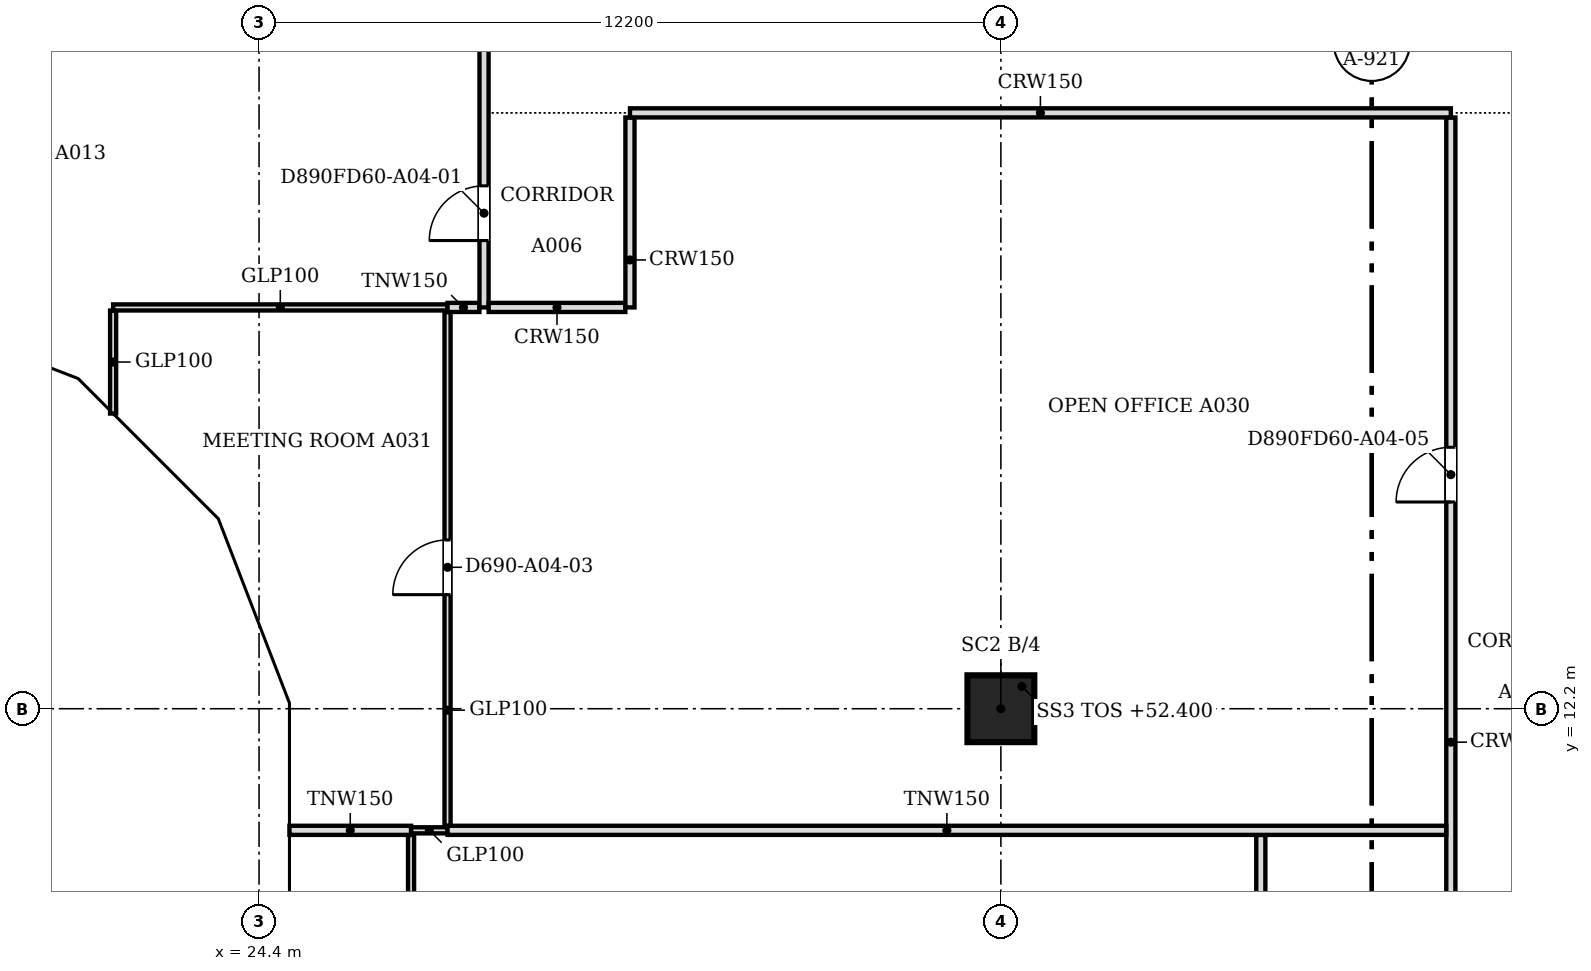
"""IFC4 building model, lengths in metres.
Left out: names, types, materials, properties, quantities, classifications, styles, units other than length and angle.
Written with IfcOpenShell. Run it as: python <this file> out.ifc"""

import sys

from ifc_helpers import new_model, si_unit, direction, frame, frame_2d, origin, origin_2d, place, context, subcontext, project, spatial, polyline, rectangle, outline, extrude, faceted_brep, source, transform, mapped, element, fill, save


model = new_model("IFC4")
c1 = context("Model", 3, precision=1e-05, world=origin(), true_north=direction((0.0, 1.0)))
c2 = subcontext(c1, "Body", "Model", "MODEL_VIEW")
j1 = project(units=[si_unit("LENGTHUNIT", "METRE"), si_unit("PLANEANGLEUNIT", "RADIAN")], contexts=[c1])
p1 = place(None, origin())
s1 = spatial("IfcSite", under=j1, at=p1, CompositionType="ELEMENT")
p2 = place(p1, origin())
s2 = spatial("IfcBuilding", under=s1, at=p2, CompositionType="ELEMENT")
p3 = place(p2, frame((0.0, 0.0, 52.4)))
s3 = spatial("IfcBuildingStorey", under=s2, at=p3, CompositionType="ELEMENT", Elevation=52.4)
p4 = place(p3, frame((36.6, 12.2, 0.0), z_axis=(0.0, 0.0, 1.0), x_axis=(1.0, 0.0, 0.0)))
e1 = element("IfcColumn", 1, at=p4, inside=s3, PredefinedType="COLUMN", context=c2, shape_type="SweptSolid", body=[
    extrude(rectangle(XDim=1.1, YDim=1.1, at=origin_2d()), origin(), (0.0, 0.0, 1.0), 3.6),
])
m1 = source(origin(), c2, "Body", "Brep", [
    faceted_brep([(3.096, -0.25, 7.536), (0.047, -0.25, 3.856), (0.047, -0.25, 3.744), (3.096, -0.25, 0.064), (0.0, 0.25, 3.8), (3.149, 0.25, 7.6), (3.202, 0.25, 7.536), (3.202, 0.25, 0.064), (3.149, 0.25, 0.0), (3.149, -0.0, 0.0), (3.149, -0.0, 7.6), (0.0, 0.0, 3.8)], [[[0, 1, 2, 3]], [[4, 5, 6, 7, 8]], [[8, 7, 9]], [[6, 5, 10]], [[5, 4, 11, 1, 0, 10]], [[4, 8, 9, 3, 2, 11]], [[11, 2, 1]], [[3, 9, 7, 6, 10, 0]]]),
])
p5 = place(p3, frame((18.346, 18.55, -3.8), z_axis=(0.0, 0.0, 1.0), x_axis=(0.932985567668, -0.359913782069, 0.0)))
e2 = element("IfcWall", 2, at=p5, inside=s3, PredefinedType="SOLIDWALL", context=c2, shape_type="MappedRepresentation", body=[
    mapped(m1, transform((0.0, 0.0, 0.0), scale=1.0)),
])
m2 = source(origin(), c2, "Body", "SweptSolid", [
    extrude(outline(polyline([(2.949, 6.967), (0.325, 3.8), (2.949, 0.633), (2.949, 6.967)])), frame((0.0, 0.26, 0.0), z_axis=(0.0, -1.0, 0.0), x_axis=(1.0, 0.0, 0.0)), (0.0, 0.0, 1.0), 0.52),
])
p6 = place(p5, origin())
e3 = element("IfcOpeningElement", 3, at=p6, cuts=e2, PredefinedType="OPENING", context=c2, shape_type="MappedRepresentation", body=[
    mapped(m2, transform((0.0, 0.0, 0.0), scale=1.0)),
])
m3 = source(origin(), c2, "Body", "Brep", [
    faceted_brep([(0.106, -0.25, 0.064), (3.156, -0.25, 3.736), (3.156, -0.25, 3.864), (0.106, -0.25, 7.536), (0.0, 0.25, 7.536), (0.053, 0.25, 7.6), (3.209, 0.25, 3.8), (0.053, 0.25, 0.0), (0.0, 0.25, 0.064), (3.209, -0.0, 3.8), (0.053, 0.0, 0.0), (0.053, 0.0, 7.6)], [[[0, 1, 2, 3]], [[4, 5, 6, 7, 8]], [[7, 6, 9, 1, 0, 10]], [[6, 5, 11, 3, 2, 9]], [[5, 4, 11]], [[8, 7, 10]], [[8, 10, 0, 3, 11, 4]], [[1, 9, 2]]]),
])
p7 = place(p3, frame((21.248, 17.454, -3.8), z_axis=(0.0, 0.0, 1.0), x_axis=(0.707106781187, -0.707106781187, 0.0)))
e4 = element("IfcWall", 4, at=p7, inside=s3, PredefinedType="SOLIDWALL", context=c2, shape_type="MappedRepresentation", body=[
    mapped(m3, transform((0.0, 0.0, 0.0), scale=1.0)),
])
m4 = source(origin(), c2, "Body", "SweptSolid", [
    extrude(outline(polyline([(0.253, 0.632), (2.884, 3.8), (0.253, 6.968), (0.253, 0.632)])), frame((0.0, 0.26, 0.0), z_axis=(0.0, -1.0, 0.0), x_axis=(1.0, 0.0, 0.0)), (0.0, 0.0, 1.0), 0.52),
])
p8 = place(p7, origin())
e5 = element("IfcOpeningElement", 5, at=p8, cuts=e4, PredefinedType="OPENING", context=c2, shape_type="MappedRepresentation", body=[
    mapped(m4, transform((0.0, 0.0, 0.0), scale=1.0)),
])
m5 = source(origin(), c2, "Body", "Brep", [
    faceted_brep([(3.103, -0.25, 7.544), (0.053, -0.25, 3.864), (0.053, -0.25, 3.736), (3.103, -0.25, 0.056), (0.0, 0.25, 3.8), (3.149, 0.25, 7.6), (3.196, 0.25, 7.543), (3.196, 0.25, 0.057), (3.149, 0.25, 0.0), (3.149, -0.0, 0.0), (3.149, -0.0, 7.6), (0.0, 0.0, 3.8)], [[[0, 1, 2, 3]], [[4, 5, 6, 7, 8]], [[8, 7, 9]], [[6, 5, 10]], [[5, 4, 11, 1, 0, 10]], [[4, 8, 9, 3, 2, 11]], [[11, 2, 1]], [[3, 9, 7, 6, 10, 0]]]),
])
p9 = place(p3, frame((23.517, 15.185, -3.8), z_axis=(0.0, 0.0, 1.0), x_axis=(0.359864468756, -0.933004589553, 0.0)))
e6 = element("IfcWall", 6, at=p9, inside=s3, PredefinedType="SOLIDWALL", context=c2, shape_type="MappedRepresentation", body=[
    mapped(m5, transform((0.0, 0.0, 0.0), scale=1.0)),
])
p10 = place(p9, origin())
e7 = element("IfcOpeningElement", 7, at=p10, cuts=e6, PredefinedType="OPENING", context=c2, shape_type="MappedRepresentation", body=[
    mapped(m2, transform((0.0, 0.0, 0.0), scale=1.0)),
])
m6 = source(origin(), c2, "Body", "Brep", [
    faceted_brep([(0.093, -0.25, 0.057), (3.143, -0.25, 3.8), (0.093, -0.25, 7.543), (0.0, 0.25, 7.544), (0.047, 0.25, 7.6), (3.143, 0.25, 3.8), (0.047, 0.25, 0.0), (0.0, 0.25, 0.056), (0.047, 0.0, 0.0), (0.047, 0.0, 7.6)], [[[0, 1, 2]], [[3, 4, 5, 6, 7]], [[6, 5, 1, 0, 8]], [[5, 4, 9, 2, 1]], [[4, 3, 9]], [[7, 6, 8]], [[7, 8, 0, 2, 9, 3]]]),
])
p11 = place(p3, frame((24.65, 12.293, -3.8), z_axis=(0.0, 0.0, 1.0), x_axis=(0.0, -1.0, 0.0)))
e8 = element("IfcWall", 8, at=p11, inside=s3, PredefinedType="SOLIDWALL", context=c2, shape_type="MappedRepresentation", body=[
    mapped(m6, transform((0.0, 0.0, 0.0), scale=1.0)),
])
m7 = source(origin(), c2, "Body", "SweptSolid", [
    extrude(outline(polyline([(0.247, 0.641), (2.821, 3.8), (0.247, 6.959), (0.247, 0.641)])), frame((0.0, 0.26, 0.0), z_axis=(0.0, -1.0, 0.0), x_axis=(1.0, 0.0, 0.0)), (0.0, 0.0, 1.0), 0.52),
])
p12 = place(p11, origin())
e9 = element("IfcOpeningElement", 9, at=p12, cuts=e8, PredefinedType="OPENING", context=c2, shape_type="MappedRepresentation", body=[
    mapped(m7, transform((0.0, 0.0, 0.0), scale=1.0)),
])
p13 = place(p2, frame((0.0, 0.0, 56.2)))
s4 = spatial("IfcBuildingStorey", under=s2, at=p13, CompositionType="ELEMENT", Elevation=56.2)
m8 = source(origin(), c2, "Body", "Brep", [
    faceted_brep([(0.093, -0.25, 0.056), (3.143, -0.25, 3.736), (3.143, -0.25, 3.864), (0.093, -0.25, 7.544), (0.0, 0.25, 7.543), (0.047, 0.25, 7.6), (3.196, 0.25, 3.8), (0.047, 0.25, 0.0), (0.0, 0.25, 0.057), (3.196, -0.0, 3.8), (0.047, 0.0, 0.0), (0.047, 0.0, 7.6)], [[[0, 1, 2, 3]], [[4, 5, 6, 7, 8]], [[7, 6, 9, 1, 0, 10]], [[6, 5, 11, 3, 2, 9]], [[5, 4, 11]], [[8, 7, 10]], [[8, 10, 0, 3, 11, 4]], [[1, 9, 2]]]),
])
p14 = place(p13, frame((18.303, 18.567, -3.8), z_axis=(0.0, 0.0, 1.0), x_axis=(0.932978940178, -0.359930961693, 0.0)))
e10 = element("IfcWall", 10, at=p14, inside=s4, PredefinedType="SOLIDWALL", context=c2, shape_type="MappedRepresentation", body=[
    mapped(m8, transform((0.0, 0.0, 0.0), scale=1.0)),
])
m9 = source(origin(), c2, "Body", "SweptSolid", [
    extrude(outline(polyline([(0.247, 0.633), (2.871, 3.8), (0.247, 6.967), (0.247, 0.633)])), frame((0.0, 0.26, 0.0), z_axis=(0.0, -1.0, 0.0), x_axis=(1.0, 0.0, 0.0)), (0.0, 0.0, 1.0), 0.52),
])
p15 = place(p14, origin())
e11 = element("IfcOpeningElement", 11, at=p15, cuts=e10, PredefinedType="OPENING", context=c2, shape_type="MappedRepresentation", body=[
    mapped(m9, transform((0.0, 0.0, 0.0), scale=1.0)),
])
m10 = source(origin(), c2, "Body", "Brep", [
    faceted_brep([(3.103, -0.25, 7.536), (0.053, -0.25, 3.864), (0.053, -0.25, 3.736), (3.103, -0.25, 0.064), (0.0, 0.25, 3.8), (3.156, 0.25, 7.6), (3.209, 0.25, 7.536), (3.209, 0.25, 0.064), (3.156, 0.25, 0.0), (3.156, -0.0, 0.0), (3.156, -0.0, 7.6), (0.0, 0.0, 3.8)], [[[0, 1, 2, 3]], [[4, 5, 6, 7, 8]], [[8, 7, 9]], [[6, 5, 10]], [[5, 4, 11, 1, 0, 10]], [[4, 8, 9, 3, 2, 11]], [[11, 2, 1]], [[3, 9, 7, 6, 10, 0]]]),
])
p16 = place(p13, frame((21.285, 17.417, -3.8), z_axis=(0.0, 0.0, 1.0), x_axis=(0.707106781187, -0.707106781187, 0.0)))
e12 = element("IfcWall", 12, at=p16, inside=s4, PredefinedType="SOLIDWALL", context=c2, shape_type="MappedRepresentation", body=[
    mapped(m10, transform((0.0, 0.0, 0.0), scale=1.0)),
])
m11 = source(origin(), c2, "Body", "SweptSolid", [
    extrude(outline(polyline([(2.956, 6.968), (0.325, 3.8), (2.956, 0.632), (2.956, 6.968)])), frame((0.0, 0.26, 0.0), z_axis=(0.0, -1.0, 0.0), x_axis=(1.0, 0.0, 0.0)), (0.0, 0.0, 1.0), 0.52),
])
p17 = place(p16, origin())
e13 = element("IfcOpeningElement", 13, at=p17, cuts=e12, PredefinedType="OPENING", context=c2, shape_type="MappedRepresentation", body=[
    mapped(m11, transform((0.0, 0.0, 0.0), scale=1.0)),
])
m12 = source(origin(), c2, "Body", "Brep", [
    faceted_brep([(0.106, -0.25, 0.064), (3.156, -0.25, 3.744), (3.156, -0.25, 3.856), (0.106, -0.25, 7.536), (0.0, 0.25, 7.536), (0.053, 0.25, 7.6), (3.202, 0.25, 3.8), (0.053, 0.25, 0.0), (0.0, 0.25, 0.064), (3.202, -0.0, 3.8), (0.053, 0.0, 0.0), (0.053, 0.0, 7.6)], [[[0, 1, 2, 3]], [[4, 5, 6, 7, 8]], [[7, 6, 9, 1, 0, 10]], [[6, 5, 11, 3, 2, 9]], [[5, 4, 11]], [[8, 7, 10]], [[8, 10, 0, 3, 11, 4]], [[1, 9, 2]]]),
])
p18 = place(p13, frame((23.497, 15.234, -3.8), z_axis=(0.0, 0.0, 1.0), x_axis=(0.359913782069, -0.932985567668, 0.0)))
e14 = element("IfcWall", 14, at=p18, inside=s4, PredefinedType="SOLIDWALL", context=c2, shape_type="MappedRepresentation", body=[
    mapped(m12, transform((0.0, 0.0, 0.0), scale=1.0)),
])
m13 = source(origin(), c2, "Body", "SweptSolid", [
    extrude(outline(polyline([(0.253, 0.633), (2.878, 3.8), (0.253, 6.967), (0.253, 0.633)])), frame((0.0, 0.26, 0.0), z_axis=(0.0, -1.0, 0.0), x_axis=(1.0, 0.0, 0.0)), (0.0, 0.0, 1.0), 0.52),
])
p19 = place(p18, origin())
e15 = element("IfcOpeningElement", 15, at=p19, cuts=e14, PredefinedType="OPENING", context=c2, shape_type="MappedRepresentation", body=[
    mapped(m13, transform((0.0, 0.0, 0.0), scale=1.0)),
])
m14 = source(origin(), c2, "Body", "Brep", [
    faceted_brep([(3.096, -0.25, 0.0), (6.1, -0.25, 3.8), (3.096, -0.25, 7.6), (0.047, -0.25, 3.857), (0.047, -0.25, 3.743), (0.0, 0.25, 3.8), (3.096, 0.25, 7.6), (6.053, 0.25, 3.859), (6.053, 0.25, 3.741), (3.096, 0.25, 0.0), (6.1, -0.0, 3.8), (0.0, 0.0, 3.8)], [[[0, 1, 2, 3, 4]], [[5, 6, 7, 8, 9]], [[9, 8, 10, 1, 0]], [[7, 6, 2, 1, 10]], [[6, 5, 11, 3, 2]], [[5, 9, 0, 4, 11]], [[11, 4, 3]], [[10, 8, 7]]]),
])
p20 = place(p13, frame((24.65, 12.247, -3.8), z_axis=(0.0, 0.0, 1.0), x_axis=(0.0, -1.0, 0.0)))
e16 = element("IfcWall", 16, at=p20, inside=s4, PredefinedType="SOLIDWALL", context=c2, shape_type="MappedRepresentation", body=[
    mapped(m14, transform((0.0, 0.0, 0.0), scale=1.0)),
])
m15 = source(origin(), c2, "Body", "SweptSolid", [
    extrude(outline(polyline([(3.094, 0.399), (5.781, 3.8), (3.094, 7.201), (0.323, 3.8), (3.094, 0.399)])), frame((0.0, 0.26, 0.0), z_axis=(0.0, -1.0, 0.0), x_axis=(1.0, 0.0, 0.0)), (0.0, 0.0, 1.0), 0.52),
])
p21 = place(p20, origin())
e17 = element("IfcOpeningElement", 17, at=p21, cuts=e16, PredefinedType="OPENING", context=c2, shape_type="MappedRepresentation", body=[
    mapped(m15, transform((0.0, 0.0, 0.0), scale=1.0)),
])
p22 = place(p3, frame((44.0, 0.5, 0.0), z_axis=(0.0, 0.0, 1.0), x_axis=(0.0, 1.0, 0.0)))
e18 = element("IfcWall", 18, at=p22, inside=s3, PredefinedType="PARTITIONING", context=c2, shape_type="SweptSolid", body=[
    extrude(rectangle(XDim=21.424, YDim=0.15, at=frame_2d((10.712, 0.0))), origin(), (0.0, 0.0, 1.0), 3.067),
])
m16 = source(origin(), c2, "Body", "SweptSolid", [
    extrude(rectangle(XDim=1.0, YDim=2.1, at=frame_2d((0.5, 1.05))), frame((0.0, 0.085, 0.0), z_axis=(0.0, -1.0, 0.0), x_axis=(1.0, 0.0, 0.0)), (0.0, 0.0, 1.0), 0.17),
])
p23 = place(p22, frame((6.2, 0.0, 0.0)))
e19 = element("IfcOpeningElement", 19, at=p23, cuts=e18, PredefinedType="OPENING", context=c2, shape_type="MappedRepresentation", body=[
    mapped(m16, transform((0.0, 0.0, 0.0), scale=1.0)),
])
m17 = source(origin(), c2, "Body", "SweptSolid", [
    extrude(rectangle(XDim=0.9, YDim=2.1, at=frame_2d((0.45, 1.05))), frame((0.0, 0.085, 0.0), z_axis=(0.0, -1.0, 0.0), x_axis=(1.0, 0.0, 0.0)), (0.0, 0.0, 1.0), 0.17),
])
p24 = place(p22, frame((15.1, 0.0, 0.0)))
e20 = element("IfcOpeningElement", 20, at=p24, cuts=e18, PredefinedType="OPENING", context=c2, shape_type="MappedRepresentation", body=[
    mapped(m17, transform((0.0, 0.0, 0.0), scale=1.0)),
])
p25 = place(p3, frame((26.9, 4.2, 0.0), z_axis=(0.0, 0.0, 1.0), x_axis=(0.0, 1.0, 0.0)))
e21 = element("IfcWall", 21, at=p25, inside=s3, PredefinedType="PARTITIONING", context=c2, shape_type="SweptSolid", body=[
    extrude(rectangle(XDim=5.924, YDim=0.1, at=frame_2d((2.962, 0.0))), origin(), (0.0, 0.0, 1.0), 3.067),
])
m18 = source(origin(), c2, "Body", "SweptSolid", [
    extrude(rectangle(XDim=0.9, YDim=2.1, at=frame_2d((0.45, 1.05))), frame((0.0, 0.06, 0.0), z_axis=(0.0, -1.0, 0.0), x_axis=(1.0, 0.0, 0.0)), (0.0, 0.0, 1.0), 0.12),
])
p26 = place(p25, frame((2.5, 0.0, 0.0)))
e22 = element("IfcOpeningElement", 22, at=p26, cuts=e21, PredefinedType="OPENING", context=c2, shape_type="MappedRepresentation", body=[
    mapped(m18, transform((0.0, 0.0, 0.0), scale=1.0)),
])
p27 = place(p3, frame((40.875, 4.2, 0.0), z_axis=(0.0, 0.0, 1.0), x_axis=(0.0, 1.0, 0.0)))
e23 = element("IfcWall", 23, at=p27, inside=s3, PredefinedType="PARTITIONING", context=c2, shape_type="SweptSolid", body=[
    extrude(rectangle(XDim=5.924, YDim=0.15, at=frame_2d((2.962, 0.0))), origin(), (0.0, 0.0, 1.0), 3.067),
])
p28 = place(p27, frame((2.5, 0.0, 0.0)))
e24 = element("IfcOpeningElement", 24, at=p28, cuts=e23, PredefinedType="OPENING", context=c2, shape_type="MappedRepresentation", body=[
    mapped(m17, transform((0.0, 0.0, 0.0), scale=1.0)),
])
p29 = place(p3, frame((24.9, 10.2, 0.0), z_axis=(0.0, 0.0, 1.0), x_axis=(1.0, 0.0, 0.0)))
e25 = element("IfcWall", 25, at=p29, inside=s3, PredefinedType="PARTITIONING", context=c2, shape_type="SweptSolid", body=[
    extrude(rectangle(XDim=2.0, YDim=0.15, at=frame_2d((1.0, 0.0))), origin(), (0.0, 0.0, 1.0), 3.067),
])
p30 = place(p3, frame((26.901, 10.2, 0.0), z_axis=(0.0, 0.0, 1.0), x_axis=(1.0, 0.0, 0.0)))
e26 = element("IfcWall", 26, at=p30, inside=s3, PredefinedType="PARTITIONING", context=c2, shape_type="SweptSolid", body=[
    extrude(rectangle(XDim=0.598, YDim=0.1, at=frame_2d((0.299, 0.0))), origin(), (0.0, 0.0, 1.0), 3.067),
])
p31 = place(p3, frame((27.5, 10.2, 0.0), z_axis=(0.0, 0.0, 1.0), x_axis=(1.0, 0.0, 0.0)))
e27 = element("IfcWall", 27, at=p31, inside=s3, PredefinedType="PARTITIONING", context=c2, shape_type="SweptSolid", body=[
    extrude(rectangle(XDim=16.424, YDim=0.15, at=frame_2d((8.212, 0.0))), origin(), (0.0, 0.0, 1.0), 3.067),
])
p32 = place(p3, frame((27.5, 10.276, 0.0), z_axis=(0.0, 0.0, 1.0), x_axis=(0.0, 1.0, 0.0)))
e28 = element("IfcWall", 28, at=p32, inside=s3, PredefinedType="PARTITIONING", context=c2, shape_type="SweptSolid", body=[
    extrude(rectangle(XDim=8.448, YDim=0.1, at=frame_2d((4.224, 0.0))), origin(), (0.0, 0.0, 1.0), 3.067),
])
p33 = place(p32, frame((3.8, 0.0, 0.0)))
e29 = element("IfcOpeningElement", 29, at=p33, cuts=e28, PredefinedType="OPENING", context=c2, shape_type="MappedRepresentation", body=[
    mapped(m18, transform((0.0, 0.0, 0.0), scale=1.0)),
])
p34 = place(p3, frame((22.0, 17.055, 0.0), z_axis=(0.0, 0.0, 1.0), x_axis=(0.0, 1.0, 0.0)))
e30 = element("IfcWall", 30, at=p34, inside=s3, PredefinedType="PARTITIONING", context=c2, shape_type="SweptSolid", body=[
    extrude(rectangle(XDim=1.694, YDim=0.1, at=frame_2d((0.847, 0.0))), origin(), (0.0, 0.0, 1.0), 3.067),
])
p35 = place(p3, frame((22.0, 18.8, 0.0), z_axis=(0.0, 0.0, 1.0), x_axis=(1.0, 0.0, 0.0)))
e31 = element("IfcWall", 31, at=p35, inside=s3, PredefinedType="PARTITIONING", context=c2, shape_type="SweptSolid", body=[
    extrude(rectangle(XDim=5.499, YDim=0.1, at=frame_2d((2.75, 0.0))), origin(), (0.0, 0.0, 1.0), 3.067),
])
p36 = place(p3, frame((27.5, 18.8, 0.0), z_axis=(0.0, 0.0, 1.0), x_axis=(1.0, 0.0, 0.0)))
e32 = element("IfcWall", 32, at=p36, inside=s3, PredefinedType="PARTITIONING", context=c2, shape_type="SweptSolid", body=[
    extrude(rectangle(XDim=0.524, YDim=0.15, at=frame_2d((0.262, 0.0))), origin(), (0.0, 0.0, 1.0), 3.067),
])
p37 = place(p3, frame((28.1, 18.8, 0.0), z_axis=(0.0, 0.0, 1.0), x_axis=(0.0, 1.0, 0.0)))
e33 = element("IfcWall", 33, at=p37, inside=s3, PredefinedType="PARTITIONING", context=c2, shape_type="SweptSolid", body=[
    extrude(rectangle(XDim=26.1, YDim=0.15, at=frame_2d((13.05, 0.0))), origin(), (0.0, 0.0, 1.0), 3.067),
])
p38 = place(p37, frame((1.1, 0.0, 0.0)))
e34 = element("IfcOpeningElement", 34, at=p38, cuts=e33, PredefinedType="OPENING", context=c2, shape_type="MappedRepresentation", body=[
    mapped(m17, transform((0.0, 0.0, 0.0), scale=1.0)),
])
p39 = place(p37, frame((22.951, 0.0, 0.0)))
e35 = element("IfcOpeningElement", 35, at=p39, cuts=e33, PredefinedType="OPENING", context=c2, shape_type="MappedRepresentation", body=[
    mapped(m16, transform((0.0, 0.0, 0.0), scale=1.0)),
])
p40 = place(p37, frame((17.251, 0.0, 0.0)))
e36 = element("IfcOpeningElement", 36, at=p40, cuts=e33, PredefinedType="OPENING", context=c2, shape_type="MappedRepresentation", body=[
    mapped(m16, transform((0.0, 0.0, 0.0), scale=1.0)),
])
p41 = place(p37, frame((9.7, 0.0, 0.0)))
e37 = element("IfcOpeningElement", 37, at=p41, cuts=e33, PredefinedType="OPENING", context=c2, shape_type="MappedRepresentation", body=[
    mapped(m16, transform((0.0, 0.0, 0.0), scale=1.0)),
])
p42 = place(p3, frame((28.176, 18.8, 0.0), z_axis=(0.0, 0.0, 1.0), x_axis=(1.0, 0.0, 0.0)))
e38 = element("IfcWall", 38, at=p42, inside=s3, PredefinedType="PARTITIONING", context=c2, shape_type="SweptSolid", body=[
    extrude(rectangle(XDim=2.248, YDim=0.15, at=frame_2d((1.124, 0.0))), origin(), (0.0, 0.0, 1.0), 3.067),
])
p43 = place(p3, frame((30.5, 18.8, 0.0), z_axis=(0.0, 0.0, 1.0), x_axis=(0.0, 1.0, 0.0)))
e39 = element("IfcWall", 39, at=p43, inside=s3, PredefinedType="PARTITIONING", context=c2, shape_type="SweptSolid", body=[
    extrude(rectangle(XDim=3.124, YDim=0.15, at=frame_2d((1.562, 0.0))), origin(), (0.0, 0.0, 1.0), 3.067),
])
p44 = place(p3, frame((30.5, 22.0, 0.0), z_axis=(0.0, 0.0, 1.0), x_axis=(1.0, 0.0, 0.0)))
e40 = element("IfcWall", 40, at=p44, inside=s3, PredefinedType="PARTITIONING", context=c2, shape_type="SweptSolid", body=[
    extrude(rectangle(XDim=13.5, YDim=0.15, at=frame_2d((6.75, 0.0))), origin(), (0.0, 0.0, 1.0), 3.067),
])
m19 = source(origin(), c2, "Body", "SweptSolid", [
    extrude(rectangle(XDim=0.9, YDim=2.1, at=frame_2d((0.45, 1.05))), frame((0.0, 0.025, 0.0), z_axis=(0.0, -1.0, 0.0), x_axis=(1.0, 0.0, 0.0)), (0.0, 0.0, 1.0), 0.05),
])
p45 = place(p38, origin())
e41 = element("IfcDoor", 41, at=p45, inside=s3, OperationType="SINGLE_SWING_LEFT", PredefinedType="DOOR", context=c2, shape_type="MappedRepresentation", body=[
    mapped(m19, transform((0.0, 0.0, 0.0), scale=1.0)),
])
fill(e34, e41)
p46 = place(p33, origin())
e42 = element("IfcDoor", 42, at=p46, inside=s3, OperationType="SINGLE_SWING_LEFT", PredefinedType="DOOR", context=c2, shape_type="MappedRepresentation", body=[
    mapped(m19, transform((0.0, 0.0, 0.0), scale=1.0)),
])
fill(e29, e42)
p47 = place(p24, origin())
e43 = element("IfcDoor", 43, at=p47, inside=s3, OperationType="SINGLE_SWING_LEFT", PredefinedType="DOOR", context=c2, shape_type="MappedRepresentation", body=[
    mapped(m19, transform((0.0, 0.0, 0.0), scale=1.0)),
])
fill(e20, e43)
save(model, sys.argv[1])
